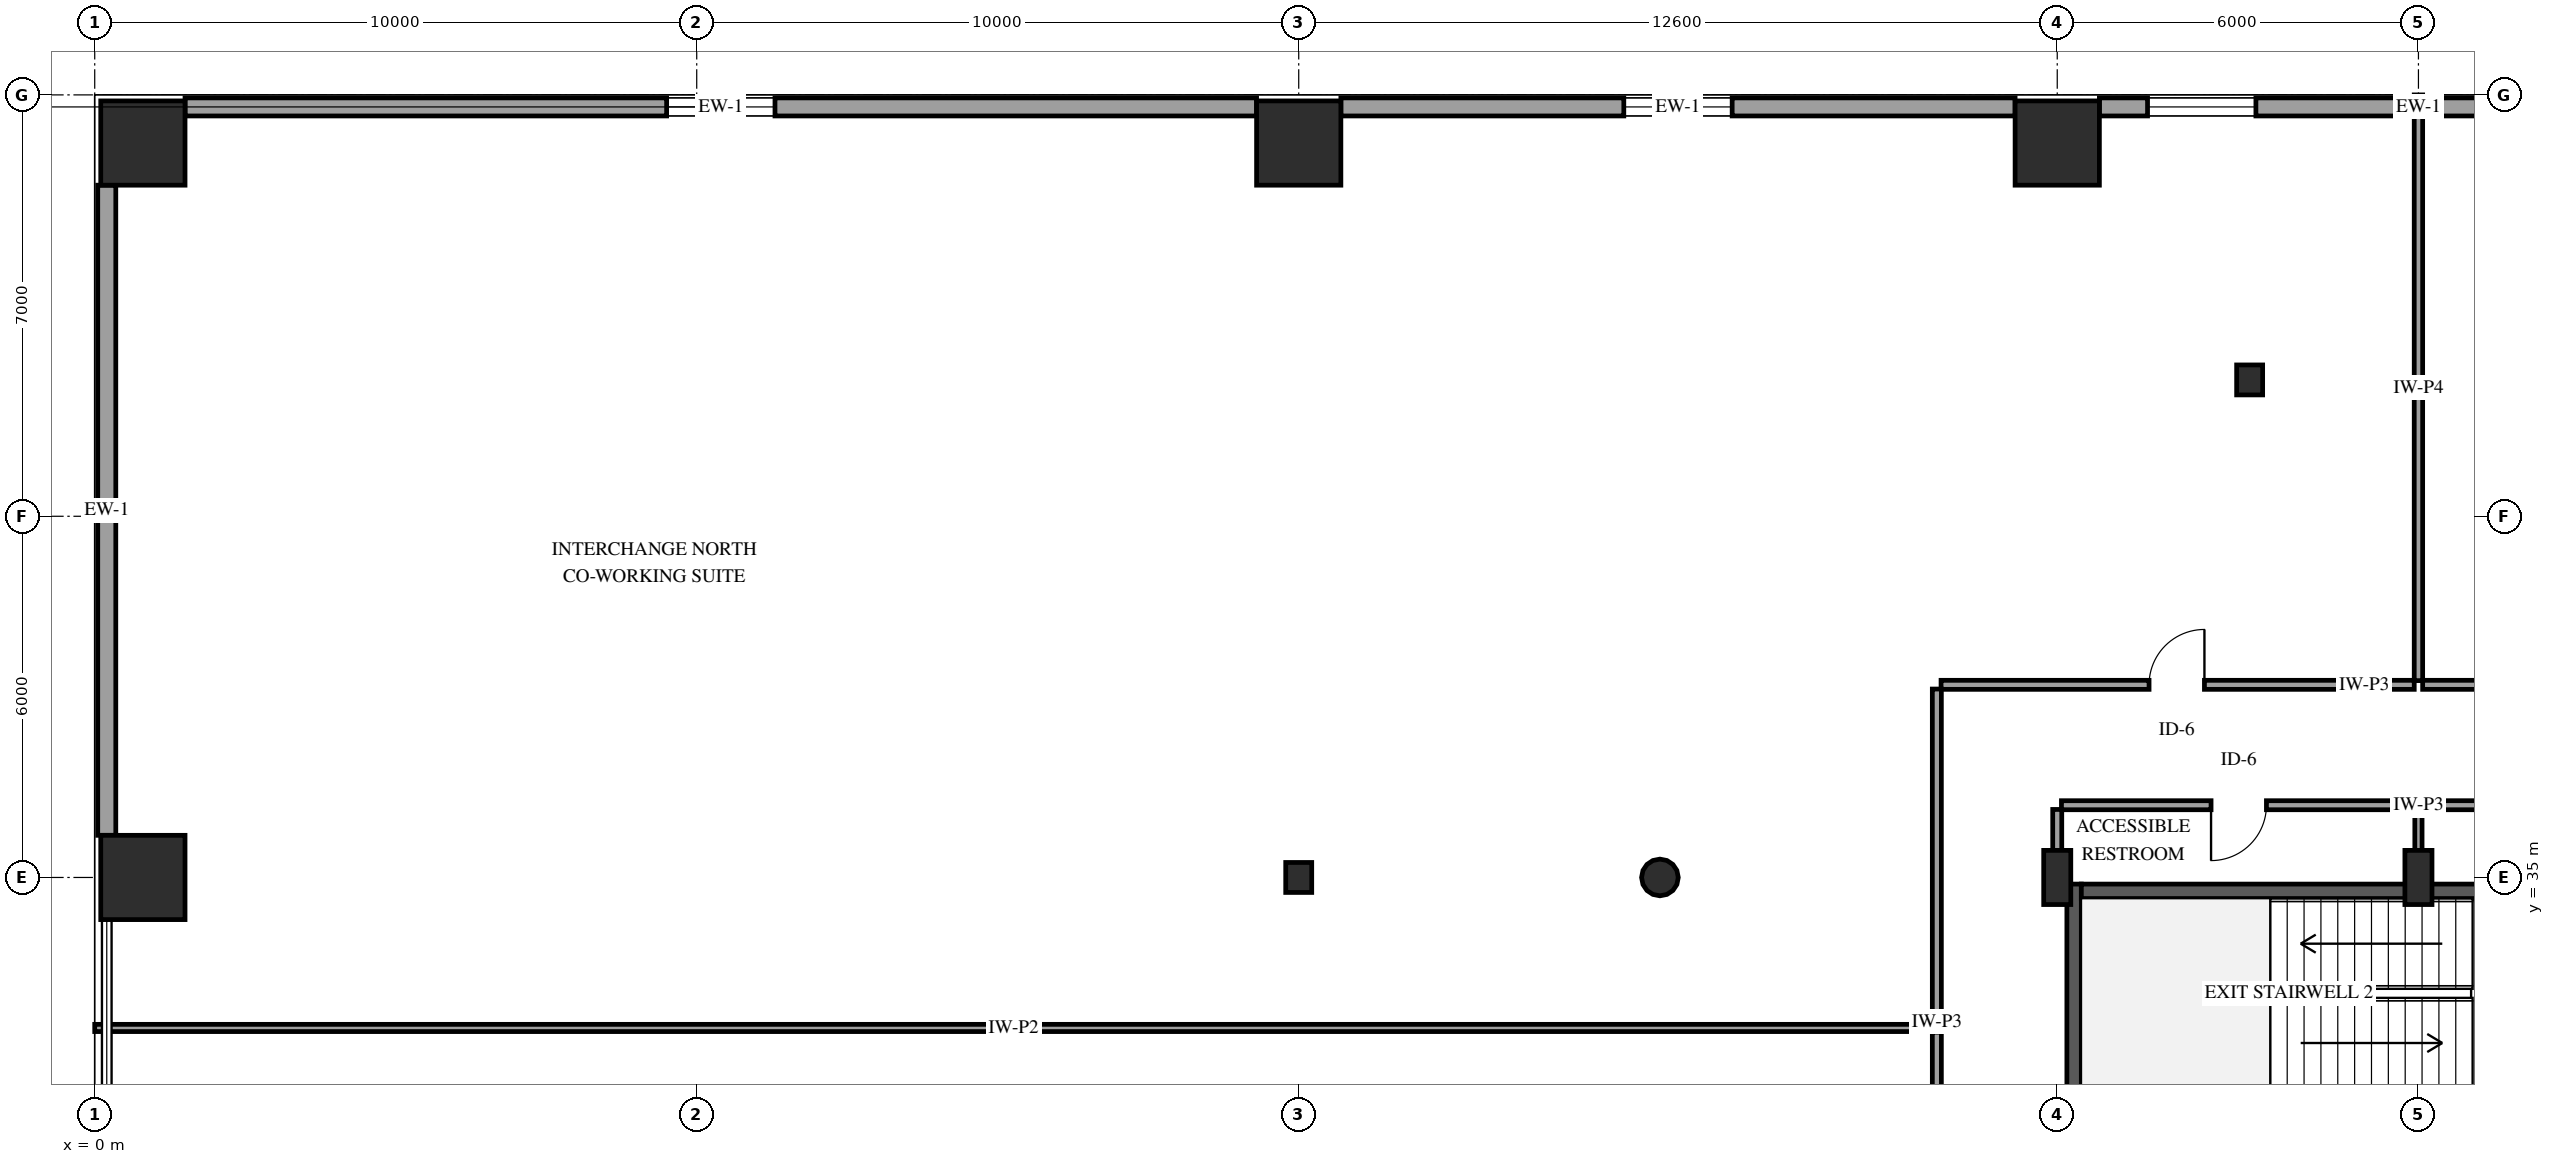
"""IFC4 building model, lengths in metres.
Left out: names, types, materials, properties, quantities, classifications, styles, units other than length and angle.
Written with IfcOpenShell. Run it as: python <this file> out.ifc"""

import sys

from ifc_helpers import new_model, si_unit, direction, frame, frame_2d, origin, origin_2d, place, context, subcontext, project, spatial, rectangle, hollow_circle, i_section, extrude, element, fill, save


model = new_model("IFC4")
c1 = context("Model", 3, precision=1e-05, world=origin(), true_north=direction((0.0, 1.0)))
c2 = subcontext(c1, "Body", "Model", "MODEL_VIEW")
j1 = project(units=[si_unit("LENGTHUNIT", "METRE"), si_unit("PLANEANGLEUNIT", "RADIAN")], contexts=[c1])
p1 = place(None, origin())
s1 = spatial("IfcSite", under=j1, at=p1, CompositionType="ELEMENT")
p2 = place(p1, origin())
s2 = spatial("IfcBuilding", under=s1, at=p2, CompositionType="ELEMENT")
p3 = place(p2, frame((0.0, 0.0, 20.7)))
s3 = spatial("IfcBuildingStorey", under=s2, at=p3, CompositionType="ELEMENT", Elevation=20.7)
p4 = place(p3, frame((32.88, 31.26, 0.0), z_axis=(0.0, 0.0, 1.0), x_axis=(0.0, 1.0, 0.0)))
e1 = element("IfcWall", 1, at=p4, inside=s3, PredefinedType="SHEAR", context=c2, shape_type="SweptSolid", body=[
    extrude(rectangle(XDim=3.63, YDim=0.24, at=frame_2d((1.815, 0.0))), origin(), (0.0, 0.0, 1.0), 4.5),
])
p5 = place(p3, frame((33.0, 34.77, 0.0), z_axis=(0.0, 0.0, 1.0), x_axis=(1.0, 0.0, 0.0)))
e2 = element("IfcWall", 2, at=p5, inside=s3, PredefinedType="SHEAR", context=c2, shape_type="SweptSolid", body=[
    extrude(rectangle(XDim=8.0, YDim=0.24, at=frame_2d((4.0, 0.0))), origin(), (0.0, 0.0, 1.0), 4.5),
])
for number, where, z_axis, x_axis in (
    (3, (32.6, 35.0, 0.0), (0.0, 0.0, 1.0), (1.0, 0.0, 0.0)),
    (4, (38.6, 35.0, 0.0), (0.0, 0.0, 1.0), (1.0, 0.0, 0.0)),
):
    element("IfcColumn", number, at=place(p3, frame(where, z_axis=z_axis, x_axis=x_axis)), inside=s3, PredefinedType="PILASTER", context=c2, shape_type="SweptSolid", body=[
        extrude(rectangle(XDim=0.45, YDim=0.9, at=origin_2d()), origin(), (0.0, 0.0, 1.0), 4.5),
    ])
p6 = place(p3, frame((0.8, 35.0, 0.0), z_axis=(0.0, 0.0, 1.0), x_axis=(1.0, 0.0, 0.0)))
e5 = element("IfcColumn", 5, at=p6, inside=s3, PredefinedType="COLUMN", context=c2, shape_type="SweptSolid", body=[
    extrude(rectangle(XDim=1.4, YDim=1.4, at=origin_2d()), origin(), (0.0, 0.0, 1.0), 4.5),
])
p7 = place(p3, frame((20.0, 35.0, 0.0), z_axis=(0.0, 0.0, 1.0), x_axis=(1.0, 0.0, 0.0)))
e6 = element("IfcColumn", 6, at=p7, inside=s3, PredefinedType="COLUMN", context=c2, shape_type="SweptSolid", body=[
    extrude(i_section(OverallWidth=0.432, OverallDepth=0.498, WebThickness=0.056, FlangeThickness=0.089, FilletRadius=0.038, at=origin_2d()), origin(), (0.0, 0.0, 1.0), 4.5),
])
for number, where, z_axis, x_axis in (
    (7, (0.8, 47.2, 0.0), (0.0, 0.0, 1.0), (1.0, 0.0, 0.0)),
    (8, (20.0, 47.2, 0.0), (0.0, 0.0, 1.0), (1.0, 0.0, 0.0)),
    (9, (32.6, 47.2, 0.0), (0.0, 0.0, 1.0), (1.0, 0.0, 0.0)),
):
    element("IfcColumn", number, at=place(p3, frame(where, z_axis=z_axis, x_axis=x_axis)), inside=s3, PredefinedType="COLUMN", context=c2, shape_type="SweptSolid", body=[
        extrude(rectangle(XDim=1.4, YDim=1.4, at=origin_2d()), origin(), (0.0, 0.0, 1.0), 4.5),
    ])
p8 = place(p3, frame((26.0, 35.0, 0.0), z_axis=(0.0, 0.0, 1.0), x_axis=(1.0, 0.0, 0.0)))
e10 = element("IfcColumn", 10, at=p8, inside=s3, PredefinedType="COLUMN", context=c2, shape_type="SweptSolid", body=[
    extrude(hollow_circle(Radius=0.305, WallThickness=0.022, at=origin_2d()), origin(), (0.0, 0.0, 1.0), 4.5),
])
p9 = place(p3, frame((35.796, 43.265, 0.0), z_axis=(0.0, 0.0, 1.0), x_axis=(1.0, 0.0, 0.0)))
e11 = element("IfcColumn", 11, at=p9, inside=s3, PredefinedType="COLUMN", context=c2, shape_type="SweptSolid", body=[
    extrude(i_section(OverallWidth=0.432, OverallDepth=0.498, WebThickness=0.056, FlangeThickness=0.089, FilletRadius=0.038, at=origin_2d()), origin(), (0.0, 0.0, 1.0), 4.5),
])
p10 = place(p3, frame((1.5, 47.8, 0.0), z_axis=(0.0, 0.0, 1.0), x_axis=(1.0, 0.0, 0.0)))
e12 = element("IfcWall", 12, at=p10, inside=s3, PredefinedType="SOLIDWALL", context=c2, shape_type="SweptSolid", body=[
    extrude(rectangle(XDim=17.8, YDim=0.3, at=frame_2d((8.9, 0.0))), origin(), (0.0, 0.0, 1.0), 3.236),
])
p11 = place(p10, frame((8.0, 0.0, 0.85)))
e13 = element("IfcOpeningElement", 13, at=p11, cuts=e12, PredefinedType="OPENING", context=c2, shape_type="SweptSolid", body=[
    extrude(rectangle(XDim=1.8, YDim=1.75, at=frame_2d((0.9, 0.875))), frame((0.0, 0.16, 0.0), z_axis=(0.0, -1.0, 0.0), x_axis=(1.0, 0.0, 0.0)), (0.0, 0.0, 1.0), 0.32),
])
p12 = place(p3, frame((20.7, 47.8, 0.0), z_axis=(0.0, 0.0, 1.0), x_axis=(1.0, 0.0, 0.0)))
e14 = element("IfcWall", 14, at=p12, inside=s3, PredefinedType="SOLIDWALL", context=c2, shape_type="SweptSolid", body=[
    extrude(rectangle(XDim=11.2, YDim=0.3, at=frame_2d((5.6, 0.0))), origin(), (0.0, 0.0, 1.0), 3.236),
])
p13 = place(p12, frame((4.7, 0.0, 0.85)))
e15 = element("IfcOpeningElement", 15, at=p13, cuts=e14, PredefinedType="OPENING", context=c2, shape_type="SweptSolid", body=[
    extrude(rectangle(XDim=1.8, YDim=1.75, at=frame_2d((0.9, 0.875))), frame((0.0, 0.16, 0.0), z_axis=(0.0, -1.0, 0.0), x_axis=(1.0, 0.0, 0.0)), (0.0, 0.0, 1.0), 0.32),
])
p14 = place(p3, frame((33.3, 47.8, 0.0), z_axis=(0.0, 0.0, 1.0), x_axis=(1.0, 0.0, 0.0)))
e16 = element("IfcWall", 16, at=p14, inside=s3, PredefinedType="SOLIDWALL", context=c2, shape_type="SweptSolid", body=[
    extrude(rectangle(XDim=10.6, YDim=0.3, at=frame_2d((5.3, 0.0))), origin(), (0.0, 0.0, 1.0), 3.236),
])
p15 = place(p14, frame((0.8, 0.0, 0.85)))
e17 = element("IfcOpeningElement", 17, at=p15, cuts=e16, PredefinedType="OPENING", context=c2, shape_type="SweptSolid", body=[
    extrude(rectangle(XDim=1.8, YDim=1.75, at=frame_2d((0.9, 0.875))), frame((0.0, 0.16, 0.0), z_axis=(0.0, -1.0, 0.0), x_axis=(1.0, 0.0, 0.0)), (0.0, 0.0, 1.0), 0.32),
])
p16 = place(p3, frame((0.2, 35.7, 0.0), z_axis=(0.0, 0.0, 1.0), x_axis=(0.0, 1.0, 0.0)))
e18 = element("IfcWall", 18, at=p16, inside=s3, PredefinedType="SOLIDWALL", context=c2, shape_type="SweptSolid", body=[
    extrude(rectangle(XDim=10.8, YDim=0.3, at=frame_2d((5.4, 0.0))), origin(), (0.0, 0.0, 1.0), 3.236),
])
p17 = place(p3, frame((0.0, 32.5, 0.0), z_axis=(0.0, 0.0, 1.0), x_axis=(1.0, 0.0, 0.0)))
e19 = element("IfcWall", 19, at=p17, inside=s3, PredefinedType="PARTITIONING", context=c2, shape_type="SweptSolid", body=[
    extrude(rectangle(XDim=30.53, YDim=0.12, at=frame_2d((15.265, 0.0))), origin(), (0.0, 0.0, 1.0), 4.18),
])
p18 = place(p3, frame((38.6, 38.27, 0.0), z_axis=(0.0, 0.0, 1.0), x_axis=(0.0, 1.0, 0.0)))
e20 = element("IfcWall", 20, at=p18, inside=s3, PredefinedType="PARTITIONING", context=c2, shape_type="SweptSolid", body=[
    extrude(rectangle(XDim=9.73, YDim=0.14, at=frame_2d((4.865, 0.0))), origin(), (0.0, 0.0, 1.0), 4.18),
])
p19 = place(p3, frame((30.67, 38.2, 0.0), z_axis=(0.0, 0.0, 1.0), x_axis=(1.0, 0.0, 0.0)))
e21 = element("IfcWall", 21, at=p19, inside=s3, PredefinedType="PARTITIONING", context=c2, shape_type="SweptSolid", body=[
    extrude(rectangle(XDim=7.86, YDim=0.15, at=frame_2d((3.93, 0.0))), origin(), (0.0, 0.0, 1.0), 4.18),
])
p20 = place(p19, frame((3.455, 0.0, 0.0)))
e22 = element("IfcOpeningElement", 22, at=p20, cuts=e21, PredefinedType="OPENING", context=c2, shape_type="SweptSolid", body=[
    extrude(rectangle(XDim=0.92, YDim=2.12, at=frame_2d((0.46, 1.06))), frame((0.0, 0.085, 0.0), z_axis=(0.0, -1.0, 0.0), x_axis=(1.0, 0.0, 0.0)), (0.0, 0.0, 1.0), 0.17),
])
p21 = place(p3, frame((38.67, 38.2, 0.0), z_axis=(0.0, 0.0, 1.0), x_axis=(1.0, 0.0, 0.0)))
e23 = element("IfcWall", 23, at=p21, inside=s3, PredefinedType="PARTITIONING", context=c2, shape_type="SweptSolid", body=[
    extrude(rectangle(XDim=6.06, YDim=0.15, at=frame_2d((3.03, 0.0))), origin(), (0.0, 0.0, 1.0), 4.18),
])
p22 = place(p3, frame((38.53, 36.2, 0.0), z_axis=(0.0, 0.0, 1.0), x_axis=(-1.0, 0.0, 0.0)))
e24 = element("IfcWall", 24, at=p22, inside=s3, PredefinedType="PARTITIONING", context=c2, shape_type="SweptSolid", body=[
    extrude(rectangle(XDim=5.86, YDim=0.15, at=frame_2d((2.93, 0.0))), origin(), (0.0, 0.0, 1.0), 4.18),
])
p23 = place(p22, frame((2.455, 0.0, 0.0)))
e25 = element("IfcOpeningElement", 25, at=p23, cuts=e24, PredefinedType="OPENING", context=c2, shape_type="SweptSolid", body=[
    extrude(rectangle(XDim=0.92, YDim=2.12, at=frame_2d((0.46, 1.06))), frame((0.0, 0.085, 0.0), z_axis=(0.0, -1.0, 0.0), x_axis=(1.0, 0.0, 0.0)), (0.0, 0.0, 1.0), 0.17),
])
p24 = place(p3, frame((44.53, 36.2, 0.0), z_axis=(0.0, 0.0, 1.0), x_axis=(-1.0, 0.0, 0.0)))
e26 = element("IfcWall", 26, at=p24, inside=s3, PredefinedType="PARTITIONING", context=c2, shape_type="SweptSolid", body=[
    extrude(rectangle(XDim=5.86, YDim=0.15, at=frame_2d((2.93, 0.0))), origin(), (0.0, 0.0, 1.0), 4.18),
])
p25 = place(p24, frame((3.627, 0.0, 0.0)))
e27 = element("IfcOpeningElement", 27, at=p25, cuts=e26, PredefinedType="OPENING", context=c2, shape_type="SweptSolid", body=[
    extrude(rectangle(XDim=0.92, YDim=2.12, at=frame_2d((0.46, 1.06))), frame((0.0, 0.085, 0.0), z_axis=(0.0, -1.0, 0.0), x_axis=(1.0, 0.0, 0.0)), (0.0, 0.0, 1.0), 0.17),
])
p26 = place(p3, frame((30.6, 32.57, 0.0), z_axis=(0.0, 0.0, 1.0), x_axis=(0.0, 1.0, 0.0)))
e28 = element("IfcWall", 28, at=p26, inside=s3, PredefinedType="PARTITIONING", context=c2, shape_type="SweptSolid", body=[
    extrude(rectangle(XDim=5.56, YDim=0.15, at=frame_2d((2.78, 0.0))), origin(), (0.0, 0.0, 1.0), 4.18),
])
p27 = place(p3, frame((30.6, 27.07, 0.0), z_axis=(0.0, 0.0, 1.0), x_axis=(0.0, 1.0, 0.0)))
e29 = element("IfcWall", 29, at=p27, inside=s3, PredefinedType="PARTITIONING", context=c2, shape_type="SweptSolid", body=[
    extrude(rectangle(XDim=5.36, YDim=0.15, at=frame_2d((2.68, 0.0))), origin(), (0.0, 0.0, 1.0), 4.18),
])
p28 = place(p3, frame((32.6, 36.13, 0.0), z_axis=(0.0, 0.0, 1.0), x_axis=(0.0, -1.0, 0.0)))
e30 = element("IfcWall", 30, at=p28, inside=s3, PredefinedType="PARTITIONING", context=c2, shape_type="SweptSolid", body=[
    extrude(rectangle(XDim=1.06, YDim=0.15, at=frame_2d((0.53, 0.0))), origin(), (0.0, 0.0, 1.0), 3.302),
])
p29 = place(p3, frame((38.6, 36.13, 0.0), z_axis=(0.0, 0.0, 1.0), x_axis=(0.0, -1.0, 0.0)))
e31 = element("IfcWall", 31, at=p29, inside=s3, PredefinedType="PARTITIONING", context=c2, shape_type="SweptSolid", body=[
    extrude(rectangle(XDim=1.06, YDim=0.12, at=frame_2d((0.53, 0.0))), origin(), (0.0, 0.0, 1.0), 4.18),
])
p30 = place(p11, origin())
e32 = element("IfcWindow", 32, at=p30, inside=s3, PartitioningType="SINGLE_PANEL", PredefinedType="WINDOW", context=c2, shape_type="SweptSolid", body=[
    extrude(rectangle(XDim=1.8, YDim=1.75, at=frame_2d((0.9, 0.875))), frame((0.0, 0.03, 0.0), z_axis=(0.0, -1.0, 0.0), x_axis=(1.0, 0.0, 0.0)), (0.0, 0.0, 1.0), 0.06),
])
fill(e13, e32)
p31 = place(p13, origin())
e33 = element("IfcWindow", 33, at=p31, inside=s3, PartitioningType="SINGLE_PANEL", PredefinedType="WINDOW", context=c2, shape_type="SweptSolid", body=[
    extrude(rectangle(XDim=1.8, YDim=1.75, at=frame_2d((0.9, 0.875))), frame((0.0, 0.03, 0.0), z_axis=(0.0, -1.0, 0.0), x_axis=(1.0, 0.0, 0.0)), (0.0, 0.0, 1.0), 0.06),
])
fill(e15, e33)
p32 = place(p15, origin())
e34 = element("IfcWindow", 34, at=p32, inside=s3, PartitioningType="SINGLE_PANEL", PredefinedType="WINDOW", context=c2, shape_type="SweptSolid", body=[
    extrude(rectangle(XDim=1.8, YDim=1.75, at=frame_2d((0.9, 0.875))), frame((0.0, 0.03, 0.0), z_axis=(0.0, -1.0, 0.0), x_axis=(1.0, 0.0, 0.0)), (0.0, 0.0, 1.0), 0.06),
])
fill(e17, e34)
p33 = place(p20, origin())
e35 = element("IfcDoor", 35, at=p33, inside=s3, OperationType="SINGLE_SWING_RIGHT", PredefinedType="DOOR", context=c2, shape_type="SweptSolid", body=[
    extrude(rectangle(XDim=0.92, YDim=2.12, at=frame_2d((0.46, 1.06))), frame((0.0, 0.025, 0.0), z_axis=(0.0, -1.0, 0.0), x_axis=(1.0, 0.0, 0.0)), (0.0, 0.0, 1.0), 0.05),
])
fill(e22, e35)
p34 = place(p23, origin())
e36 = element("IfcDoor", 36, at=p34, inside=s3, OperationType="SINGLE_SWING_RIGHT", PredefinedType="DOOR", context=c2, shape_type="SweptSolid", body=[
    extrude(rectangle(XDim=0.92, YDim=2.12, at=frame_2d((0.46, 1.06))), frame((0.0, 0.025, 0.0), z_axis=(0.0, -1.0, 0.0), x_axis=(1.0, 0.0, 0.0)), (0.0, 0.0, 1.0), 0.05),
])
fill(e25, e36)
save(model, sys.argv[1])
